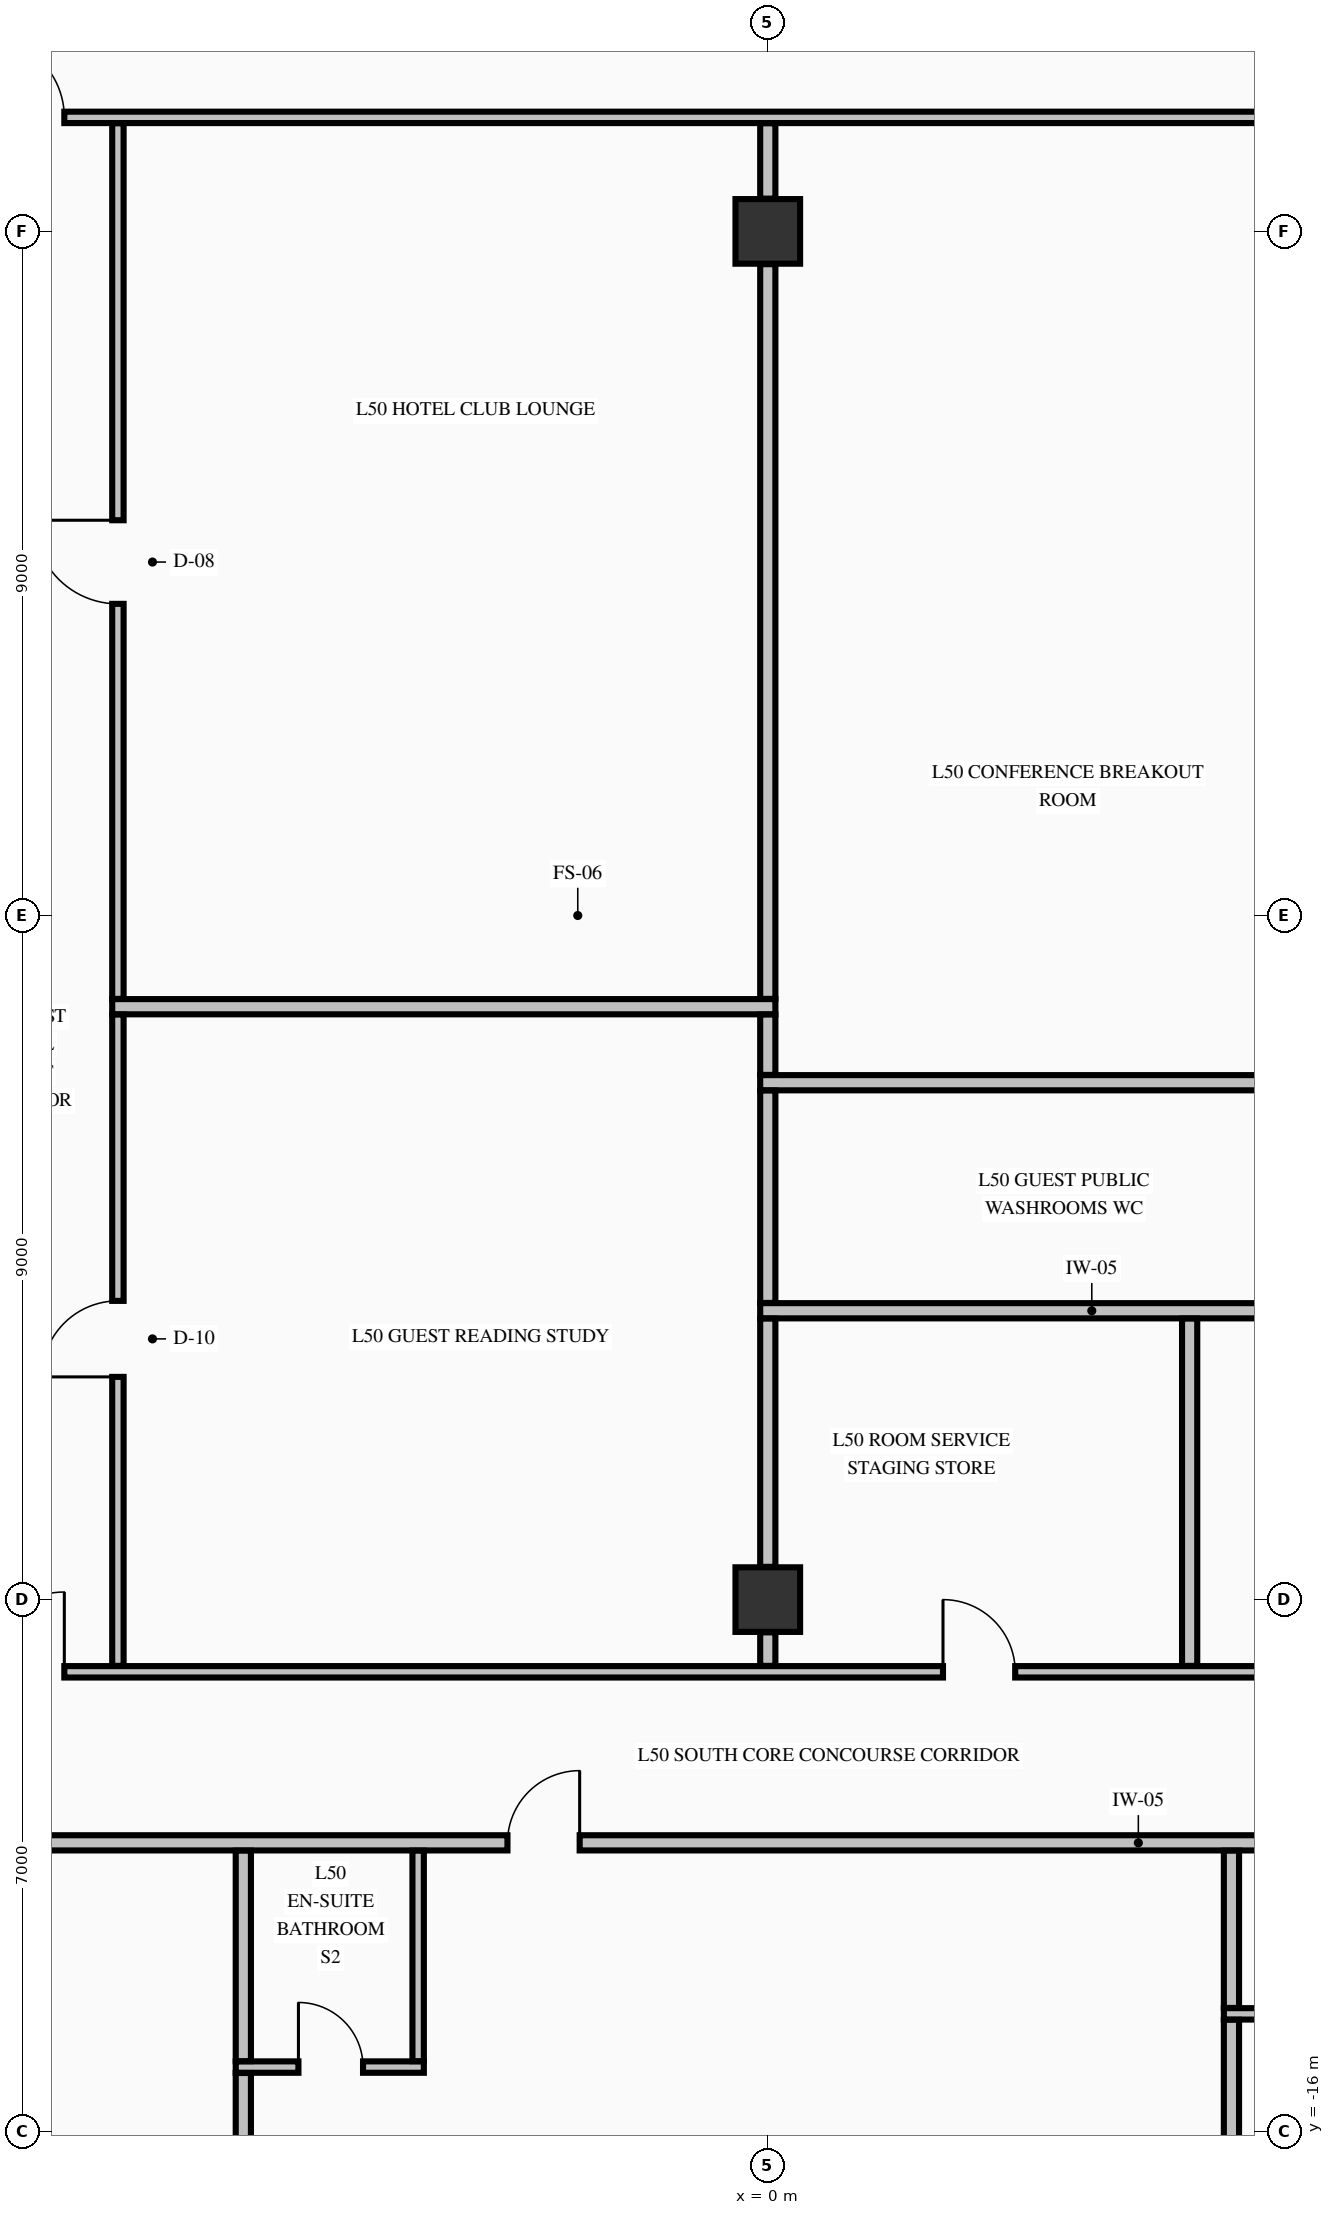
"""IFC4 building model, lengths in metres.
Left out: names, types, materials, properties, quantities, classifications, styles, units other than length and angle.
Written with IfcOpenShell. Run it as: python <this file> out.ifc"""

import sys

from ifc_helpers import new_model, si_unit, direction, frame, frame_2d, origin, origin_2d, place, context, subcontext, project, spatial, rectangle, extrude, element, fill, save


model = new_model("IFC4")
c1 = context("Model", 3, precision=1e-05, world=origin(), true_north=direction((0.0, 1.0)))
c2 = subcontext(c1, "Body", "Model", "MODEL_VIEW")
j1 = project(units=[si_unit("LENGTHUNIT", "METRE"), si_unit("PLANEANGLEUNIT", "RADIAN")], contexts=[c1])
p1 = place(None, origin())
s1 = spatial("IfcSite", under=j1, at=p1, CompositionType="ELEMENT")
p2 = place(p1, origin())
s2 = spatial("IfcBuilding", under=s1, at=p2, CompositionType="ELEMENT")
p3 = place(p2, frame((0.0, 0.0, 194.86)))
s3 = spatial("IfcBuildingStorey", under=s2, at=p3, CompositionType="ELEMENT", Elevation=194.86)
for number, where, z_axis, x_axis in (
    (1, (0.0, -9.0, -0.275), (0.0, 0.0, 1.0), (1.0, 0.0, 0.0)),
    (2, (0.0, 9.0, -0.275), (0.0, 0.0, 1.0), (1.0, 0.0, 0.0)),
):
    element("IfcColumn", number, at=place(p3, frame(where, z_axis=z_axis, x_axis=x_axis)), inside=s3, PredefinedType="COLUMN", context=c2, shape_type="SweptSolid", body=[
        extrude(rectangle(XDim=0.85, YDim=0.85, at=origin_2d()), origin(), (0.0, 0.0, 1.0), 3.425),
    ])
p4 = place(p3, frame((-7.0, -15.15, 0.0), z_axis=(0.0, 0.0, 1.0), x_axis=(1.0, 0.0, 0.0)))
e3 = element("IfcWall", 3, at=p4, inside=s3, PredefinedType="PARTITIONING", context=c2, shape_type="SweptSolid", body=[
    extrude(rectangle(XDim=2.475, YDim=0.15, at=frame_2d((1.238, 0.0))), origin(), (0.0, 0.0, 1.0), 3.15),
])
p5 = place(p4, frame((0.825, 0.0, 0.0)))
e4 = element("IfcOpeningElement", 4, at=p5, cuts=e3, PredefinedType="OPENING", context=c2, shape_type="SweptSolid", body=[
    extrude(rectangle(XDim=0.85, YDim=2.1, at=frame_2d((0.425, 1.05))), frame((0.0, 0.085, 0.0), z_axis=(0.0, -1.0, 0.0), x_axis=(1.0, 0.0, 0.0)), (0.0, 0.0, 1.0), 0.17),
])
p6 = place(p3, frame((6.0, -14.45, 0.0), z_axis=(0.0, 0.0, 1.0), x_axis=(1.0, 0.0, 0.0)))
e5 = element("IfcWall", 5, at=p6, inside=s3, PredefinedType="PARTITIONING", context=c2, shape_type="SweptSolid", body=[
    extrude(rectangle(XDim=2.475, YDim=0.15, at=frame_2d((1.238, 0.0))), origin(), (0.0, 0.0, 1.0), 3.15),
])
p7 = place(p6, frame((0.825, 0.0, 0.0)))
e6 = element("IfcOpeningElement", 6, at=p7, cuts=e5, PredefinedType="OPENING", context=c2, shape_type="SweptSolid", body=[
    extrude(rectangle(XDim=0.85, YDim=2.1, at=frame_2d((0.425, 1.05))), frame((0.0, 0.085, 0.0), z_axis=(0.0, -1.0, 0.0), x_axis=(1.0, 0.0, 0.0)), (0.0, 0.0, 1.0), 0.17),
])
p8 = place(p3, frame((-22.1, -12.2, 0.0), z_axis=(0.0, 0.0, 1.0), x_axis=(1.0, 0.0, 0.0)))
e7 = element("IfcWall", 7, at=p8, inside=s3, PredefinedType="PARTITIONING", context=c2, shape_type="SweptSolid", body=[
    extrude(rectangle(XDim=39.2, YDim=0.2, at=frame_2d((19.6, 0.0))), origin(), (0.0, 0.0, 1.0), 3.15),
])
p9 = place(p8, frame((8.225, 0.0, 0.0)))
e8 = element("IfcOpeningElement", 8, at=p9, cuts=e7, PredefinedType="OPENING", context=c2, shape_type="SweptSolid", body=[
    extrude(rectangle(XDim=1.05, YDim=2.15, at=frame_2d((0.525, 1.075))), frame((0.0, 0.11, 0.0), z_axis=(0.0, -1.0, 0.0), x_axis=(1.0, 0.0, 0.0)), (0.0, 0.0, 1.0), 0.22),
])
p10 = place(p8, frame((18.675, 0.0, 0.0)))
e9 = element("IfcOpeningElement", 9, at=p10, cuts=e7, PredefinedType="OPENING", context=c2, shape_type="SweptSolid", body=[
    extrude(rectangle(XDim=0.95, YDim=2.15, at=frame_2d((0.475, 1.075))), frame((0.0, 0.11, 0.0), z_axis=(0.0, -1.0, 0.0), x_axis=(1.0, 0.0, 0.0)), (0.0, 0.0, 1.0), 0.22),
])
p11 = place(p8, frame((34.325, 0.0, 0.0)))
e10 = element("IfcOpeningElement", 10, at=p11, cuts=e7, PredefinedType="OPENING", context=c2, shape_type="SweptSolid", body=[
    extrude(rectangle(XDim=0.95, YDim=2.15, at=frame_2d((0.475, 1.075))), frame((0.0, 0.11, 0.0), z_axis=(0.0, -1.0, 0.0), x_axis=(1.0, 0.0, 0.0)), (0.0, 0.0, 1.0), 0.22),
])
p12 = place(p3, frame((-10.569, -9.95, 0.0), z_axis=(0.0, 0.0, 1.0), x_axis=(1.0, 0.0, 0.0)))
e11 = element("IfcWall", 11, at=p12, inside=s3, PredefinedType="PARTITIONING", context=c2, shape_type="SweptSolid", body=[
    extrude(rectangle(XDim=21.138, YDim=0.15, at=frame_2d((10.569, 0.0))), origin(), (0.0, 0.0, 1.0), 3.15),
])
p13 = place(p12, frame((0.264, 0.0, 0.0)))
e12 = element("IfcOpeningElement", 12, at=p13, cuts=e11, PredefinedType="OPENING", context=c2, shape_type="SweptSolid", body=[
    extrude(rectangle(XDim=1.05, YDim=2.15, at=frame_2d((0.525, 1.075))), frame((0.0, 0.085, 0.0), z_axis=(0.0, -1.0, 0.0), x_axis=(1.0, 0.0, 0.0)), (0.0, 0.0, 1.0), 0.17),
])
p14 = place(p12, frame((19.824, 0.0, 0.0)))
e13 = element("IfcOpeningElement", 13, at=p14, cuts=e11, PredefinedType="OPENING", context=c2, shape_type="SweptSolid", body=[
    extrude(rectangle(XDim=1.05, YDim=2.15, at=frame_2d((0.525, 1.075))), frame((0.0, 0.085, 0.0), z_axis=(0.0, -1.0, 0.0), x_axis=(1.0, 0.0, 0.0)), (0.0, 0.0, 1.0), 0.17),
])
p15 = place(p12, frame((12.874, 0.0, 0.0)))
e14 = element("IfcOpeningElement", 14, at=p15, cuts=e11, PredefinedType="OPENING", context=c2, shape_type="SweptSolid", body=[
    extrude(rectangle(XDim=0.95, YDim=2.15, at=frame_2d((0.475, 1.075))), frame((0.0, 0.085, 0.0), z_axis=(0.0, -1.0, 0.0), x_axis=(1.0, 0.0, 0.0)), (0.0, 0.0, 1.0), 0.17),
])
for number, where, z_axis, x_axis in (
    (15, (-0.1, -5.2, 0.0), (0.0, 0.0, 1.0), (1.0, 0.0, 0.0)),
    (16, (-0.1, -2.2, 0.0), (0.0, 0.0, 1.0), (1.0, 0.0, 0.0)),
    (17, (-8.625, -1.2, 0.0), (0.0, 0.0, 1.0), (1.0, 0.0, 0.0)),
):
    element("IfcWall", number, at=place(p3, frame(where, z_axis=z_axis, x_axis=x_axis)), inside=s3, PredefinedType="PARTITIONING", context=c2, shape_type="SweptSolid", body=[
        extrude(rectangle(XDim=8.725, YDim=0.2, at=frame_2d((4.363, 0.0))), origin(), (0.0, 0.0, 1.0), 3.15),
    ])
p16 = place(p3, frame((-10.569, 10.5, 0.0), z_axis=(0.0, 0.0, 1.0), x_axis=(1.0, 0.0, 0.0)))
e18 = element("IfcWall", 18, at=p16, inside=s3, PredefinedType="PARTITIONING", context=c2, shape_type="SweptSolid", body=[
    extrude(rectangle(XDim=21.138, YDim=0.15, at=frame_2d((10.569, 0.0))), origin(), (0.0, 0.0, 1.0), 3.15),
])
p17 = place(p16, frame((0.264, 0.0, 0.0)))
e19 = element("IfcOpeningElement", 19, at=p17, cuts=e18, PredefinedType="OPENING", context=c2, shape_type="SweptSolid", body=[
    extrude(rectangle(XDim=1.05, YDim=2.15, at=frame_2d((0.525, 1.075))), frame((0.0, 0.085, 0.0), z_axis=(0.0, -1.0, 0.0), x_axis=(1.0, 0.0, 0.0)), (0.0, 0.0, 1.0), 0.17),
])
p18 = place(p16, frame((19.824, 0.0, 0.0)))
e20 = element("IfcOpeningElement", 20, at=p18, cuts=e18, PredefinedType="OPENING", context=c2, shape_type="SweptSolid", body=[
    extrude(rectangle(XDim=1.05, YDim=2.15, at=frame_2d((0.525, 1.075))), frame((0.0, 0.085, 0.0), z_axis=(0.0, -1.0, 0.0), x_axis=(1.0, 0.0, 0.0)), (0.0, 0.0, 1.0), 0.17),
])
p19 = place(p3, frame((-8.55, -9.872, 0.0), z_axis=(0.0, 0.0, 1.0), x_axis=(0.0, 1.0, 0.0)))
e21 = element("IfcWall", 21, at=p19, inside=s3, PredefinedType="PARTITIONING", context=c2, shape_type="SweptSolid", body=[
    extrude(rectangle(XDim=8.569, YDim=0.15, at=frame_2d((4.285, 0.0))), origin(), (0.0, 0.0, 1.0), 3.15),
])
p20 = place(p19, frame((3.802, 0.0, 0.0)))
e22 = element("IfcOpeningElement", 22, at=p20, cuts=e21, PredefinedType="OPENING", context=c2, shape_type="SweptSolid", body=[
    extrude(rectangle(XDim=1.0, YDim=2.15, at=frame_2d((0.5, 1.075))), frame((0.0, 0.085, 0.0), z_axis=(0.0, -1.0, 0.0), x_axis=(1.0, 0.0, 0.0)), (0.0, 0.0, 1.0), 0.17),
])
p21 = place(p3, frame((-8.55, -1.097, 0.0), z_axis=(0.0, 0.0, 1.0), x_axis=(0.0, 1.0, 0.0)))
e23 = element("IfcWall", 23, at=p21, inside=s3, PredefinedType="PARTITIONING", context=c2, shape_type="SweptSolid", body=[
    extrude(rectangle(XDim=11.519, YDim=0.15, at=frame_2d((5.76, 0.0))), origin(), (0.0, 0.0, 1.0), 3.15),
])
p22 = place(p21, frame((5.197, 0.0, 0.0)))
e24 = element("IfcOpeningElement", 24, at=p22, cuts=e23, PredefinedType="OPENING", context=c2, shape_type="SweptSolid", body=[
    extrude(rectangle(XDim=1.1, YDim=2.15, at=frame_2d((0.55, 1.075))), frame((0.0, 0.085, 0.0), z_axis=(0.0, -1.0, 0.0), x_axis=(1.0, 0.0, 0.0)), (0.0, 0.0, 1.0), 0.17),
])
p23 = place(p3, frame((-6.9, -24.335, 0.0), z_axis=(0.0, 0.0, 1.0), x_axis=(0.0, 1.0, 0.0)))
e25 = element("IfcWall", 25, at=p23, inside=s3, PredefinedType="PARTITIONING", context=c2, shape_type="SweptSolid", body=[
    extrude(rectangle(XDim=9.107, YDim=0.2, at=frame_2d((4.553, 0.0))), origin(), (0.0, 0.0, 1.0), 3.15),
])
p24 = place(p3, frame((-6.9, -15.072, 0.0), z_axis=(0.0, 0.0, 1.0), x_axis=(0.0, 1.0, 0.0)))
e26 = element("IfcWall", 26, at=p24, inside=s3, PredefinedType="PARTITIONING", context=c2, shape_type="SweptSolid", body=[
    extrude(rectangle(XDim=2.769, YDim=0.2, at=frame_2d((1.385, 0.0))), origin(), (0.0, 0.0, 1.0), 3.15),
])
p25 = place(p3, frame((-4.6, -15.072, 0.0), z_axis=(0.0, 0.0, 1.0), x_axis=(0.0, 1.0, 0.0)))
e27 = element("IfcWall", 27, at=p25, inside=s3, PredefinedType="PARTITIONING", context=c2, shape_type="SweptSolid", body=[
    extrude(rectangle(XDim=2.769, YDim=0.15, at=frame_2d((1.385, 0.0))), origin(), (0.0, 0.0, 1.0), 3.15),
])
p26 = place(p3, frame((0.0, -9.872, 0.0), z_axis=(0.0, 0.0, 1.0), x_axis=(0.0, 1.0, 0.0)))
e28 = element("IfcWall", 28, at=p26, inside=s3, PredefinedType="PARTITIONING", context=c2, shape_type="SweptSolid", body=[
    extrude(rectangle(XDim=0.441, YDim=0.2, at=frame_2d((0.221, 0.0))), origin(), (0.0, 0.0, 1.0), 2.342),
])
p27 = place(p3, frame((0.0, -8.569, 0.0), z_axis=(0.0, 0.0, 1.0), x_axis=(0.0, 1.0, 0.0)))
e29 = element("IfcWall", 29, at=p27, inside=s3, PredefinedType="PARTITIONING", context=c2, shape_type="SweptSolid", body=[
    extrude(rectangle(XDim=3.266, YDim=0.2, at=frame_2d((1.633, 0.0))), origin(), (0.0, 0.0, 1.0), 2.342),
])
p28 = place(p3, frame((0.0, -5.097, 0.0), z_axis=(0.0, 0.0, 1.0), x_axis=(0.0, 1.0, 0.0)))
e30 = element("IfcWall", 30, at=p28, inside=s3, PredefinedType="PARTITIONING", context=c2, shape_type="SweptSolid", body=[
    extrude(rectangle(XDim=2.794, YDim=0.2, at=frame_2d((1.397, 0.0))), origin(), (0.0, 0.0, 1.0), 2.342),
])
p29 = place(p3, frame((0.0, -2.097, 0.0), z_axis=(0.0, 0.0, 1.0), x_axis=(0.0, 1.0, 0.0)))
e31 = element("IfcWall", 31, at=p29, inside=s3, PredefinedType="PARTITIONING", context=c2, shape_type="SweptSolid", body=[
    extrude(rectangle(XDim=0.794, YDim=0.2, at=frame_2d((0.397, 0.0))), origin(), (0.0, 0.0, 1.0), 2.342),
])
p30 = place(p3, frame((0.0, -1.097, 0.0), z_axis=(0.0, 0.0, 1.0), x_axis=(0.0, 1.0, 0.0)))
e32 = element("IfcWall", 32, at=p30, inside=s3, PredefinedType="PARTITIONING", context=c2, shape_type="SweptSolid", body=[
    extrude(rectangle(XDim=9.666, YDim=0.2, at=frame_2d((4.833, 0.0))), origin(), (0.0, 0.0, 1.0), 2.342),
])
p31 = place(p3, frame((0.0, 9.431, 0.0), z_axis=(0.0, 0.0, 1.0), x_axis=(0.0, 1.0, 0.0)))
e33 = element("IfcWall", 33, at=p31, inside=s3, PredefinedType="PARTITIONING", context=c2, shape_type="SweptSolid", body=[
    extrude(rectangle(XDim=0.991, YDim=0.2, at=frame_2d((0.496, 0.0))), origin(), (0.0, 0.0, 1.0), 2.342),
])
p32 = place(p3, frame((5.55, -9.872, 0.0), z_axis=(0.0, 0.0, 1.0), x_axis=(0.0, 1.0, 0.0)))
e34 = element("IfcWall", 34, at=p32, inside=s3, PredefinedType="PARTITIONING", context=c2, shape_type="SweptSolid", body=[
    extrude(rectangle(XDim=4.569, YDim=0.2, at=frame_2d((2.285, 0.0))), origin(), (0.0, 0.0, 1.0), 3.15),
])
p33 = place(p3, frame((6.1, -24.335, 0.0), z_axis=(0.0, 0.0, 1.0), x_axis=(0.0, 1.0, 0.0)))
e35 = element("IfcWall", 35, at=p33, inside=s3, PredefinedType="PARTITIONING", context=c2, shape_type="SweptSolid", body=[
    extrude(rectangle(XDim=9.807, YDim=0.2, at=frame_2d((4.903, 0.0))), origin(), (0.0, 0.0, 1.0), 3.15),
])
p34 = place(p3, frame((6.1, -14.372, 0.0), z_axis=(0.0, 0.0, 1.0), x_axis=(0.0, 1.0, 0.0)))
e36 = element("IfcWall", 36, at=p34, inside=s3, PredefinedType="PARTITIONING", context=c2, shape_type="SweptSolid", body=[
    extrude(rectangle(XDim=2.069, YDim=0.2, at=frame_2d((1.035, 0.0))), origin(), (0.0, 0.0, 1.0), 3.15),
])
p35 = place(p17, origin())
e37 = element("IfcDoor", 37, at=p35, inside=s3, OperationType="SINGLE_SWING_LEFT", PredefinedType="DOOR", context=c2, shape_type="SweptSolid", body=[
    extrude(rectangle(XDim=1.05, YDim=2.15, at=frame_2d((0.525, 1.075))), frame((0.0, 0.025, 0.0), z_axis=(0.0, -1.0, 0.0), x_axis=(1.0, 0.0, 0.0)), (0.0, 0.0, 1.0), 0.05),
])
fill(e19, e37)
p36 = place(p13, origin())
e38 = element("IfcDoor", 38, at=p36, inside=s3, OperationType="SINGLE_SWING_RIGHT", PredefinedType="DOOR", context=c2, shape_type="SweptSolid", body=[
    extrude(rectangle(XDim=1.05, YDim=2.15, at=frame_2d((0.525, 1.075))), frame((0.0, 0.025, 0.0), z_axis=(0.0, -1.0, 0.0), x_axis=(1.0, 0.0, 0.0)), (0.0, 0.0, 1.0), 0.05),
])
fill(e12, e38)
p37 = place(p10, origin())
e39 = element("IfcDoor", 39, at=p37, inside=s3, OperationType="SINGLE_SWING_RIGHT", PredefinedType="DOOR", context=c2, shape_type="SweptSolid", body=[
    extrude(rectangle(XDim=0.95, YDim=2.15, at=frame_2d((0.475, 1.075))), frame((0.0, 0.025, 0.0), z_axis=(0.0, -1.0, 0.0), x_axis=(1.0, 0.0, 0.0)), (0.0, 0.0, 1.0), 0.05),
])
fill(e9, e39)
p38 = place(p5, origin())
e40 = element("IfcDoor", 40, at=p38, inside=s3, OperationType="SINGLE_SWING_LEFT", PredefinedType="DOOR", context=c2, shape_type="SweptSolid", body=[
    extrude(rectangle(XDim=0.85, YDim=2.1, at=frame_2d((0.425, 1.05))), frame((0.0, 0.025, 0.0), z_axis=(0.0, -1.0, 0.0), x_axis=(1.0, 0.0, 0.0)), (0.0, 0.0, 1.0), 0.05),
])
fill(e4, e40)
p39 = place(p22, origin())
e41 = element("IfcDoor", 41, at=p39, inside=s3, OperationType="SINGLE_SWING_RIGHT", PredefinedType="DOOR", context=c2, shape_type="SweptSolid", body=[
    extrude(rectangle(XDim=1.1, YDim=2.15, at=frame_2d((0.55, 1.075))), frame((0.0, 0.025, 0.0), z_axis=(0.0, -1.0, 0.0), x_axis=(1.0, 0.0, 0.0)), (0.0, 0.0, 1.0), 0.05),
])
fill(e24, e41)
p40 = place(p20, origin())
e42 = element("IfcDoor", 42, at=p40, inside=s3, OperationType="SINGLE_SWING_LEFT", PredefinedType="DOOR", context=c2, shape_type="SweptSolid", body=[
    extrude(rectangle(XDim=1.0, YDim=2.15, at=frame_2d((0.5, 1.075))), frame((0.0, 0.025, 0.0), z_axis=(0.0, -1.0, 0.0), x_axis=(1.0, 0.0, 0.0)), (0.0, 0.0, 1.0), 0.05),
])
fill(e22, e42)
p41 = place(p15, origin())
e43 = element("IfcDoor", 43, at=p41, inside=s3, OperationType="SINGLE_SWING_LEFT", PredefinedType="DOOR", context=c2, shape_type="SweptSolid", body=[
    extrude(rectangle(XDim=0.95, YDim=2.15, at=frame_2d((0.475, 1.075))), frame((0.0, 0.025, 0.0), z_axis=(0.0, -1.0, 0.0), x_axis=(1.0, 0.0, 0.0)), (0.0, 0.0, 1.0), 0.05),
])
fill(e14, e43)
save(model, sys.argv[1])
